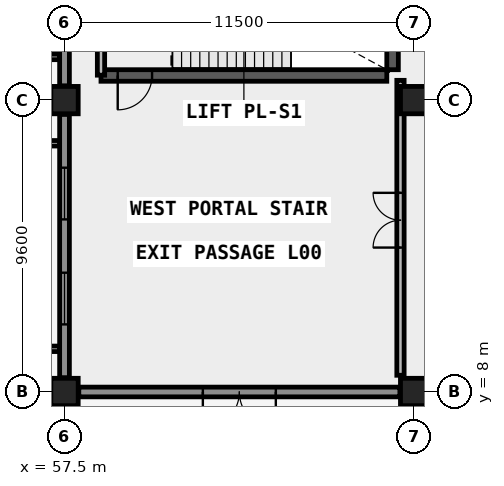
"""IFC4 building model, lengths in metres.
Left out: names, types, materials, properties, quantities, classifications, styles, units other than length and angle.
Written with IfcOpenShell. Run it as: python <this file> out.ifc"""

import sys

from ifc_helpers import new_model, si_unit, direction, frame, frame_2d, origin, origin_2d, place, context, subcontext, project, spatial, rectangle, circle, extrude, element, fill, save


model = new_model("IFC4")
c1 = context("Model", 3, precision=1e-05, world=origin(), true_north=direction((0.0, 1.0)))
c2 = subcontext(c1, "Body", "Model", "MODEL_VIEW")
j1 = project(units=[si_unit("LENGTHUNIT", "METRE"), si_unit("PLANEANGLEUNIT", "RADIAN")], contexts=[c1])
p1 = place(None, origin())
s1 = spatial("IfcSite", under=j1, at=p1, CompositionType="ELEMENT")
p2 = place(p1, origin())
s2 = spatial("IfcBuilding", under=s1, at=p2, CompositionType="ELEMENT")
p3 = place(p2, origin())
s3 = spatial("IfcBuildingStorey", under=s2, at=p3, CompositionType="ELEMENT", Elevation=0.0)
for number, where, z_axis, x_axis in (
    (1, (57.5, 8.0, 0.0), (0.0, 0.0, 1.0), (1.0, 0.0, 0.0)),
    (2, (57.5, 17.6, 0.0), (0.0, 0.0, 1.0), (1.0, 0.0, 0.0)),
    (3, (69.0, 8.0, 0.0), (0.0, 0.0, 1.0), (1.0, 0.0, 0.0)),
    (4, (69.0, 17.6, 0.0), (0.0, 0.0, 1.0), (1.0, 0.0, 0.0)),
):
    element("IfcColumn", number, at=place(p3, frame(where, z_axis=z_axis, x_axis=x_axis)), inside=s3, PredefinedType="COLUMN", context=c2, shape_type="SweptSolid", body=[
        extrude(circle(Radius=0.45, at=origin_2d()), origin(), (0.0, 0.0, 1.0), 4.2),
    ])
p4 = place(p3, frame((58.7, 18.41, 0.0), z_axis=(0.0, 0.0, 1.0), x_axis=(1.0, 0.0, 0.0)))
e5 = element("IfcWall", 5, at=p4, inside=s3, PredefinedType="SHEAR", context=c2, shape_type="SweptSolid", body=[
    extrude(rectangle(XDim=9.4, YDim=0.38, at=frame_2d((4.7, 0.0))), origin(), (0.0, 0.0, 1.0), 4.2),
])
p5 = place(p4, frame((0.55, 0.0, 0.0)))
e6 = element("IfcOpeningElement", 6, at=p5, cuts=e5, PredefinedType="OPENING", context=c2, shape_type="SweptSolid", body=[
    extrude(rectangle(XDim=1.13, YDim=2.15, at=frame_2d((0.565, 1.075))), frame((0.0, 0.2, 0.0), z_axis=(0.0, -1.0, 0.0), x_axis=(1.0, 0.0, 0.0)), (0.0, 0.0, 1.0), 0.4),
])
p6 = place(p3, frame((68.29, 18.6, 0.0), z_axis=(0.0, 0.0, 1.0), x_axis=(0.0, 1.0, 0.0)))
e7 = element("IfcWall", 7, at=p6, inside=s3, PredefinedType="SHEAR", context=c2, shape_type="SweptSolid", body=[
    extrude(rectangle(XDim=3.8, YDim=0.38, at=frame_2d((1.9, 0.0))), origin(), (0.0, 0.0, 1.0), 4.2),
])
p7 = place(p3, frame((57.97, 8.0, 0.0), z_axis=(0.0, 0.0, 1.0), x_axis=(1.0, 0.0, 0.0)))
e8 = element("IfcWall", 8, at=p7, inside=s3, PredefinedType="SOLIDWALL", context=c2, shape_type="SweptSolid", body=[
    extrude(rectangle(XDim=10.56, YDim=0.32, at=frame_2d((5.28, 0.0))), origin(), (0.0, 0.0, 1.0), 3.0),
])
p8 = place(p7, frame((4.08, 0.0, 0.0)))
e9 = element("IfcOpeningElement", 9, at=p8, cuts=e8, PredefinedType="OPENING", context=c2, shape_type="SweptSolid", body=[
    extrude(rectangle(XDim=2.4, YDim=2.6, at=frame_2d((1.2, 1.3))), frame((0.0, 0.17, 0.0), z_axis=(0.0, -1.0, 0.0), x_axis=(1.0, 0.0, 0.0)), (0.0, 0.0, 1.0), 0.34),
])
p9 = place(p3, frame((57.5, 8.47, 0.0), z_axis=(0.0, 0.0, 1.0), x_axis=(0.0, 1.0, 0.0)))
e10 = element("IfcWall", 10, at=p9, inside=s3, PredefinedType="SOLIDWALL", context=c2, shape_type="SweptSolid", body=[
    extrude(rectangle(XDim=8.66, YDim=0.32, at=frame_2d((4.33, 0.0))), origin(), (0.0, 0.0, 1.0), 3.0),
])
p10 = place(p9, frame((1.753, 0.0, 0.85)))
e11 = element("IfcOpeningElement", 11, at=p10, cuts=e10, PredefinedType="OPENING", context=c2, shape_type="SweptSolid", body=[
    extrude(rectangle(XDim=1.7, YDim=1.5, at=frame_2d((0.85, 0.75))), frame((0.0, 0.17, 0.0), z_axis=(0.0, -1.0, 0.0), x_axis=(1.0, 0.0, 0.0)), (0.0, 0.0, 1.0), 0.34),
])
p11 = place(p9, frame((5.207, 0.0, 0.85)))
e12 = element("IfcOpeningElement", 12, at=p11, cuts=e10, PredefinedType="OPENING", context=c2, shape_type="SweptSolid", body=[
    extrude(rectangle(XDim=1.7, YDim=1.5, at=frame_2d((0.85, 0.75))), frame((0.0, 0.17, 0.0), z_axis=(0.0, -1.0, 0.0), x_axis=(1.0, 0.0, 0.0)), (0.0, 0.0, 1.0), 0.34),
])
p12 = place(p3, frame((57.5, 18.07, 0.0), z_axis=(0.0, 0.0, 1.0), x_axis=(0.0, 1.0, 0.0)))
e13 = element("IfcWall", 13, at=p12, inside=s3, PredefinedType="SOLIDWALL", context=c2, shape_type="SweptSolid", body=[
    extrude(rectangle(XDim=8.66, YDim=0.32, at=frame_2d((4.33, 0.0))), origin(), (0.0, 0.0, 1.0), 3.0),
])
p13 = place(p12, frame((1.753, 0.0, 0.85)))
e14 = element("IfcOpeningElement", 14, at=p13, cuts=e13, PredefinedType="OPENING", context=c2, shape_type="SweptSolid", body=[
    extrude(rectangle(XDim=1.7, YDim=1.5, at=frame_2d((0.85, 0.75))), frame((0.0, 0.17, 0.0), z_axis=(0.0, -1.0, 0.0), x_axis=(1.0, 0.0, 0.0)), (0.0, 0.0, 1.0), 0.34),
])
p14 = place(p12, frame((5.207, 0.0, 0.85)))
e15 = element("IfcOpeningElement", 15, at=p14, cuts=e13, PredefinedType="OPENING", context=c2, shape_type="SweptSolid", body=[
    extrude(rectangle(XDim=1.7, YDim=1.5, at=frame_2d((0.85, 0.75))), frame((0.0, 0.17, 0.0), z_axis=(0.0, -1.0, 0.0), x_axis=(1.0, 0.0, 0.0)), (0.0, 0.0, 1.0), 0.34),
])
p15 = place(p3, frame((58.7, 18.42, 0.0), z_axis=(0.0, 0.0, 1.0), x_axis=(0.0, 1.0, 0.0)))
e16 = element("IfcWall", 16, at=p15, inside=s3, PredefinedType="SOLIDWALL", context=c2, shape_type="SweptSolid", body=[
    extrude(rectangle(XDim=4.16, YDim=0.24, at=frame_2d((2.08, 0.0))), origin(), (0.0, 0.0, 1.0), 3.88),
])
p16 = place(p15, frame((1.3, 0.0, 0.0)))
e17 = element("IfcOpeningElement", 17, at=p16, cuts=e16, PredefinedType="OPENING", context=c2, shape_type="SweptSolid", body=[
    extrude(rectangle(XDim=1.13, YDim=2.15, at=frame_2d((0.565, 1.075))), frame((0.0, 0.13, 0.0), z_axis=(0.0, -1.0, 0.0), x_axis=(1.0, 0.0, 0.0)), (0.0, 0.0, 1.0), 0.26),
])
p17 = place(p3, frame((68.55, 8.55, 0.0), z_axis=(0.0, 0.0, 1.0), x_axis=(0.0, 1.0, 0.0)))
e18 = element("IfcWall", 18, at=p17, inside=s3, PredefinedType="SOLIDWALL", context=c2, shape_type="SweptSolid", body=[
    extrude(rectangle(XDim=9.7, YDim=0.24, at=frame_2d((4.85, 0.0))), origin(), (0.0, 0.0, 1.0), 3.88),
])
p18 = place(p17, frame((4.2, 0.0, 0.0)))
e19 = element("IfcOpeningElement", 19, at=p18, cuts=e18, PredefinedType="OPENING", context=c2, shape_type="SweptSolid", body=[
    extrude(rectangle(XDim=1.8, YDim=2.2, at=frame_2d((0.9, 1.1))), frame((0.0, 0.13, 0.0), z_axis=(0.0, -1.0, 0.0), x_axis=(1.0, 0.0, 0.0)), (0.0, 0.0, 1.0), 0.26),
])
p19 = place(p8, frame((1.2, 0.0, 0.0), z_axis=(0.0, 0.0, 1.0), x_axis=(-1.0, 0.0, 0.0)))
e20 = element("IfcDoor", 20, at=p19, inside=s3, OperationType="DOUBLE_DOOR_SINGLE_SWING", PredefinedType="DOOR", context=c2, shape_type="SweptSolid", body=[
    extrude(rectangle(XDim=2.4, YDim=2.6, at=frame_2d((0.0, 1.3))), frame((0.0, 0.025, 0.0), z_axis=(0.0, -1.0, 0.0), x_axis=(1.0, 0.0, 0.0)), (0.0, 0.0, 1.0), 0.05),
])
fill(e9, e20)
p20 = place(p10, origin())
e21 = element("IfcWindow", 21, at=p20, inside=s3, PartitioningType="SINGLE_PANEL", PredefinedType="WINDOW", context=c2, shape_type="SweptSolid", body=[
    extrude(rectangle(XDim=1.7, YDim=1.5, at=frame_2d((0.85, 0.75))), frame((0.0, 0.03, 0.0), z_axis=(0.0, -1.0, 0.0), x_axis=(1.0, 0.0, 0.0)), (0.0, 0.0, 1.0), 0.06),
])
fill(e11, e21)
p21 = place(p11, origin())
e22 = element("IfcWindow", 22, at=p21, inside=s3, PartitioningType="SINGLE_PANEL", PredefinedType="WINDOW", context=c2, shape_type="SweptSolid", body=[
    extrude(rectangle(XDim=1.7, YDim=1.5, at=frame_2d((0.85, 0.75))), frame((0.0, 0.03, 0.0), z_axis=(0.0, -1.0, 0.0), x_axis=(1.0, 0.0, 0.0)), (0.0, 0.0, 1.0), 0.06),
])
fill(e12, e22)
p22 = place(p5, frame((0.565, 0.0, 0.0), z_axis=(0.0, 0.0, 1.0), x_axis=(-1.0, 0.0, 0.0)))
e23 = element("IfcDoor", 23, at=p22, inside=s3, OperationType="SINGLE_SWING_LEFT", PredefinedType="DOOR", context=c2, shape_type="SweptSolid", body=[
    extrude(rectangle(XDim=1.13, YDim=2.15, at=frame_2d((0.0, 1.075))), frame((0.0, 0.025, 0.0), z_axis=(0.0, -1.0, 0.0), x_axis=(1.0, 0.0, 0.0)), (0.0, 0.0, 1.0), 0.05),
])
fill(e6, e23)
p23 = place(p18, origin())
e24 = element("IfcDoor", 24, at=p23, inside=s3, OperationType="DOUBLE_DOOR_SINGLE_SWING", PredefinedType="DOOR", context=c2, shape_type="SweptSolid", body=[
    extrude(rectangle(XDim=1.8, YDim=2.2, at=frame_2d((0.9, 1.1))), frame((0.0, 0.025, 0.0), z_axis=(0.0, -1.0, 0.0), x_axis=(1.0, 0.0, 0.0)), (0.0, 0.0, 1.0), 0.05),
])
fill(e19, e24)
save(model, sys.argv[1])
